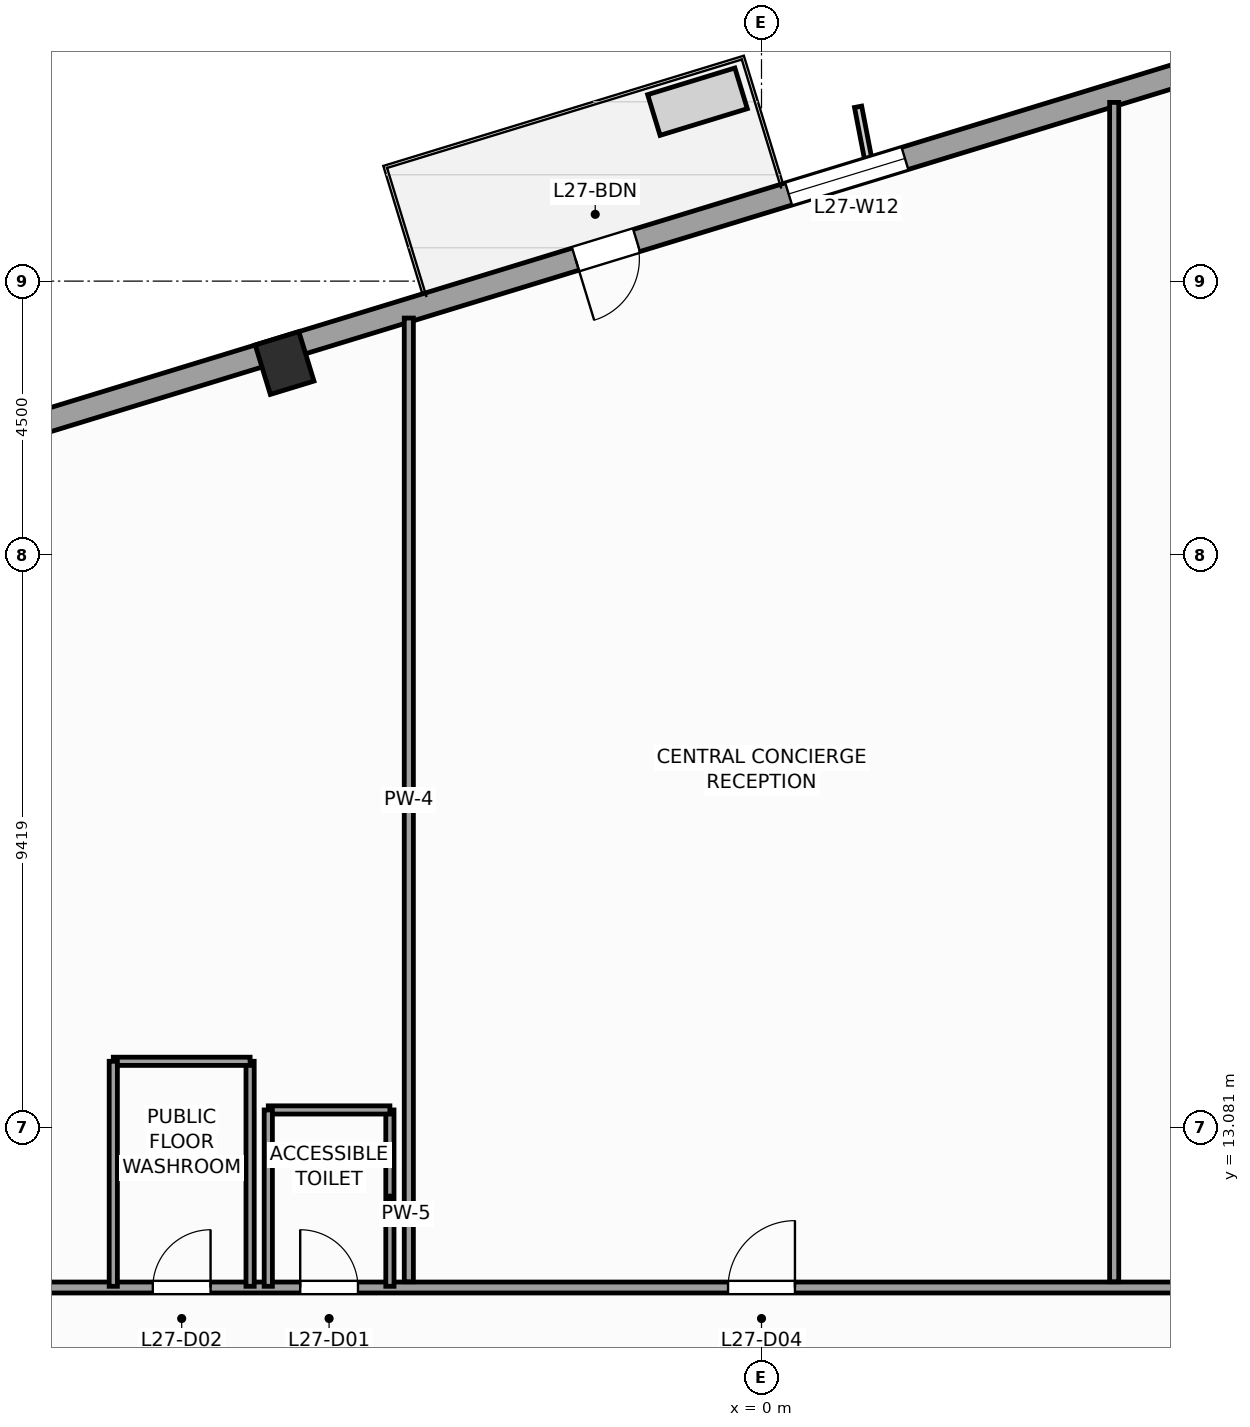
"""IFC4 building model, lengths in metres.
Left out: names, types, materials, properties, quantities, classifications, styles, units other than length and angle.
Written with IfcOpenShell. Run it as: python <this file> out.ifc"""

import sys

from ifc_helpers import new_model, si_unit, direction, frame, frame_2d, origin, origin_2d, place, context, subcontext, project, spatial, rectangle, extrude, source, transform, mapped, element, fill, save


model = new_model("IFC4")
c1 = context("Model", 3, precision=1e-05, world=origin(), true_north=direction((0.0, 1.0)))
c2 = subcontext(c1, "Body", "Model", "MODEL_VIEW")
j1 = project(units=[si_unit("LENGTHUNIT", "METRE"), si_unit("PLANEANGLEUNIT", "RADIAN")], contexts=[c1])
p1 = place(None, origin())
s1 = spatial("IfcSite", under=j1, at=p1, CompositionType="ELEMENT")
p2 = place(p1, origin())
s2 = spatial("IfcBuilding", under=s1, at=p2, CompositionType="ELEMENT")
p3 = place(p2, frame((0.0, 0.0, 115.2)))
s3 = spatial("IfcBuildingStorey", under=s2, at=p3, CompositionType="ELEMENT", Elevation=115.2)
m1 = source(origin(), c2, "Body", "SweptSolid", [
    extrude(rectangle(XDim=0.75, YDim=0.85, at=origin_2d()), origin(), (0.0, 0.0, 1.0), 4.0),
])
p4 = place(p3, frame((-7.843, 25.653, 0.0), z_axis=(0.0, 0.0, 1.0), x_axis=(0.956304755963, 0.292371704723, 0.0)))
e1 = element("IfcColumn", 1, at=p4, inside=s3, PredefinedType="COLUMN", context=c2, shape_type="MappedRepresentation", body=[
    mapped(m1, transform((0.0, 0.0, 0.0), scale=1.0)),
])
p5 = place(p3, frame((14.265, 32.658, 0.0), z_axis=(0.0, 0.0, 1.0), x_axis=(-0.956304320851, -0.292373127906, 0.0)))
e2 = element("IfcWall", 2, at=p5, inside=s3, PredefinedType="STANDARD", context=c2, shape_type="SweptSolid", body=[
    extrude(rectangle(XDim=46.38, YDim=0.38, at=frame_2d((23.19, 0.0))), origin(), (0.0, 0.0, 1.0), 3.14),
])
p6 = place(p5, frame((17.065, 0.0, 0.0)))
e3 = element("IfcOpeningElement", 3, at=p6, cuts=e2, PredefinedType="OPENING", context=c2, shape_type="SweptSolid", body=[
    extrude(rectangle(XDim=1.05, YDim=2.25, at=frame_2d((0.525, 1.125))), frame((0.0, 0.2, 0.0), z_axis=(0.0, -1.0, 0.0), x_axis=(1.0, 0.0, 0.0)), (0.0, 0.0, 1.0), 0.4),
])
p7 = place(p5, frame((4.865, 0.0, 0.51)))
e4 = element("IfcOpeningElement", 4, at=p7, cuts=e2, PredefinedType="OPENING", context=c2, shape_type="SweptSolid", body=[
    extrude(rectangle(XDim=1.4, YDim=2.4, at=frame_2d((0.7, 1.2))), frame((0.0, 0.2, 0.0), z_axis=(0.0, -1.0, 0.0), x_axis=(1.0, 0.0, 0.0)), (0.0, 0.0, 1.0), 0.4),
])
p8 = place(p5, frame((12.45, 0.0, 0.51)))
e5 = element("IfcOpeningElement", 5, at=p8, cuts=e2, PredefinedType="OPENING", context=c2, shape_type="SweptSolid", body=[
    extrude(rectangle(XDim=2.0, YDim=2.4, at=frame_2d((1.0, 1.2))), frame((0.0, 0.2, 0.0), z_axis=(0.0, -1.0, 0.0), x_axis=(1.0, 0.0, 0.0)), (0.0, 0.0, 1.0), 0.4),
])
p9 = place(p5, frame((30.538, 0.0, 0.51)))
e6 = element("IfcOpeningElement", 6, at=p9, cuts=e2, PredefinedType="OPENING", context=c2, shape_type="SweptSolid", body=[
    extrude(rectangle(XDim=2.0, YDim=2.4, at=frame_2d((1.0, 1.2))), frame((0.0, 0.2, 0.0), z_axis=(0.0, -1.0, 0.0), x_axis=(1.0, 0.0, 0.0)), (0.0, 0.0, 1.0), 0.4),
])
p10 = place(p5, frame((39.187, 0.0, 0.51)))
e7 = element("IfcOpeningElement", 7, at=p10, cuts=e2, PredefinedType="OPENING", context=c2, shape_type="SweptSolid", body=[
    extrude(rectangle(XDim=1.4, YDim=2.4, at=frame_2d((0.7, 1.2))), frame((0.0, 0.2, 0.0), z_axis=(0.0, -1.0, 0.0), x_axis=(1.0, 0.0, 0.0)), (0.0, 0.0, 1.0), 0.4),
])
p11 = place(p3, frame((-12.6, 10.45, 0.0), z_axis=(0.0, 0.0, 1.0), x_axis=(1.0, 0.0, 0.0)))
e8 = element("IfcWall", 8, at=p11, inside=s3, PredefinedType="PARTITIONING", context=c2, shape_type="SweptSolid", body=[
    extrude(rectangle(XDim=25.2, YDim=0.18, at=frame_2d((12.6, 0.0))), origin(), (0.0, 0.0, 1.0), 3.74),
])
p12 = place(p11, frame((5.014, 0.0, 0.0)))
e9 = element("IfcOpeningElement", 9, at=p12, cuts=e8, PredefinedType="OPENING", context=c2, shape_type="SweptSolid", body=[
    extrude(rectangle(XDim=0.95, YDim=2.1, at=frame_2d((0.475, 1.05))), frame((0.0, 0.1, 0.0), z_axis=(0.0, -1.0, 0.0), x_axis=(1.0, 0.0, 0.0)), (0.0, 0.0, 1.0), 0.2),
])
p13 = place(p11, frame((2.59, 0.0, 0.0)))
e10 = element("IfcOpeningElement", 10, at=p13, cuts=e8, PredefinedType="OPENING", context=c2, shape_type="SweptSolid", body=[
    extrude(rectangle(XDim=0.95, YDim=2.1, at=frame_2d((0.475, 1.05))), frame((0.0, 0.1, 0.0), z_axis=(0.0, -1.0, 0.0), x_axis=(1.0, 0.0, 0.0)), (0.0, 0.0, 1.0), 0.2),
])
p14 = place(p11, frame((12.05, 0.0, 0.0)))
e11 = element("IfcOpeningElement", 11, at=p14, cuts=e8, PredefinedType="OPENING", context=c2, shape_type="SweptSolid", body=[
    extrude(rectangle(XDim=1.1, YDim=2.2, at=frame_2d((0.55, 1.1))), frame((0.0, 0.1, 0.0), z_axis=(0.0, -1.0, 0.0), x_axis=(1.0, 0.0, 0.0)), (0.0, 0.0, 1.0), 0.2),
])
p15 = place(p3, frame((-5.8, 10.545, 0.0), z_axis=(0.0, 0.0, 1.0), x_axis=(0.0, 1.0, 0.0)))
e12 = element("IfcWall", 12, at=p15, inside=s3, PredefinedType="PARTITIONING", context=c2, shape_type="SweptSolid", body=[
    extrude(rectangle(XDim=15.848, YDim=0.15, at=frame_2d((7.924, 0.0))), origin(), (0.0, 0.0, 1.0), 3.74),
])
p16 = place(p3, frame((5.8, 10.545, 0.0), z_axis=(0.0, 0.0, 1.0), x_axis=(0.0, 1.0, 0.0)))
e13 = element("IfcWall", 13, at=p16, inside=s3, PredefinedType="PARTITIONING", context=c2, shape_type="SweptSolid", body=[
    extrude(rectangle(XDim=19.394, YDim=0.15, at=frame_2d((9.697, 0.0))), origin(), (0.0, 0.0, 1.0), 3.74),
])
p17 = place(p3, frame((-6.111, 10.47, 0.0), z_axis=(0.0, 0.0, 1.0), x_axis=(0.0, 1.0, 0.0)))
e14 = element("IfcWall", 14, at=p17, inside=s3, PredefinedType="PARTITIONING", context=c2, shape_type="SweptSolid", body=[
    extrude(rectangle(XDim=2.9, YDim=0.135, at=frame_2d((1.45, 0.0))), origin(), (0.0, 0.0, 1.0), 3.74),
])
p18 = place(p3, frame((-8.111, 13.37, 0.0), z_axis=(0.0, 0.0, 1.0), x_axis=(1.0, 0.0, 0.0)))
e15 = element("IfcWall", 15, at=p18, inside=s3, PredefinedType="PARTITIONING", context=c2, shape_type="SweptSolid", body=[
    extrude(rectangle(XDim=2.0, YDim=0.135, at=frame_2d((1.0, 0.0))), origin(), (0.0, 0.0, 1.0), 2.732),
])
p19 = place(p3, frame((-8.111, 10.47, 0.0), z_axis=(0.0, 0.0, 1.0), x_axis=(0.0, 1.0, 0.0)))
e16 = element("IfcWall", 16, at=p19, inside=s3, PredefinedType="PARTITIONING", context=c2, shape_type="SweptSolid", body=[
    extrude(rectangle(XDim=2.9, YDim=0.135, at=frame_2d((1.45, 0.0))), origin(), (0.0, 0.0, 1.0), 3.74),
])
p20 = place(p3, frame((-8.41, 10.47, 0.0), z_axis=(0.0, 0.0, 1.0), x_axis=(0.0, 1.0, 0.0)))
e17 = element("IfcWall", 17, at=p20, inside=s3, PredefinedType="PARTITIONING", context=c2, shape_type="SweptSolid", body=[
    extrude(rectangle(XDim=3.7, YDim=0.135, at=frame_2d((1.85, 0.0))), origin(), (0.0, 0.0, 1.0), 3.74),
])
p21 = place(p3, frame((-10.66, 14.17, 0.0), z_axis=(0.0, 0.0, 1.0), x_axis=(1.0, 0.0, 0.0)))
e18 = element("IfcWall", 18, at=p21, inside=s3, PredefinedType="PARTITIONING", context=c2, shape_type="SweptSolid", body=[
    extrude(rectangle(XDim=2.25, YDim=0.135, at=frame_2d((1.125, 0.0))), origin(), (0.0, 0.0, 1.0), 3.74),
])
p22 = place(p3, frame((-10.66, 10.47, 0.0), z_axis=(0.0, 0.0, 1.0), x_axis=(0.0, 1.0, 0.0)))
e19 = element("IfcWall", 19, at=p22, inside=s3, PredefinedType="PARTITIONING", context=c2, shape_type="SweptSolid", body=[
    extrude(rectangle(XDim=3.7, YDim=0.135, at=frame_2d((1.85, 0.0))), origin(), (0.0, 0.0, 1.0), 3.74),
])
m2 = source(origin(), c2, "Body", "SweptSolid", [
    extrude(rectangle(XDim=1.05, YDim=2.25, at=frame_2d((0.525, 1.125))), frame((0.0, 0.025, 0.0), z_axis=(0.0, -1.0, 0.0), x_axis=(1.0, 0.0, 0.0)), (0.0, 0.0, 1.0), 0.05),
])
p23 = place(p6, origin())
e20 = element("IfcDoor", 20, at=p23, inside=s3, OperationType="SINGLE_SWING_RIGHT", PredefinedType="DOOR", context=c2, shape_type="MappedRepresentation", body=[
    mapped(m2, transform((0.0, 0.0, 0.0), scale=1.0)),
])
fill(e3, e20)
m3 = source(origin(), c2, "Body", "SweptSolid", [
    extrude(rectangle(XDim=2.0, YDim=2.4, at=frame_2d((1.0, 1.2))), frame((0.0, 0.03, 0.0), z_axis=(0.0, -1.0, 0.0), x_axis=(1.0, 0.0, 0.0)), (0.0, 0.0, 1.0), 0.06),
])
p24 = place(p8, origin())
e21 = element("IfcWindow", 21, at=p24, inside=s3, PartitioningType="SINGLE_PANEL", PredefinedType="WINDOW", context=c2, shape_type="MappedRepresentation", body=[
    mapped(m3, transform((0.0, 0.0, 0.0), scale=1.0)),
])
fill(e5, e21)
m4 = source(origin(), c2, "Body", "SweptSolid", [
    extrude(rectangle(XDim=0.95, YDim=2.1, at=frame_2d((0.475, 1.05))), frame((0.0, 0.025, 0.0), z_axis=(0.0, -1.0, 0.0), x_axis=(1.0, 0.0, 0.0)), (0.0, 0.0, 1.0), 0.05),
])
p25 = place(p12, origin())
e22 = element("IfcDoor", 22, at=p25, inside=s3, OperationType="SINGLE_SWING_LEFT", PredefinedType="DOOR", context=c2, shape_type="MappedRepresentation", body=[
    mapped(m4, transform((0.0, 0.0, 0.0), scale=1.0)),
])
fill(e9, e22)
p26 = place(p13, origin())
e23 = element("IfcDoor", 23, at=p26, inside=s3, OperationType="SINGLE_SWING_RIGHT", PredefinedType="DOOR", context=c2, shape_type="MappedRepresentation", body=[
    mapped(m4, transform((0.0, 0.0, 0.0), scale=1.0)),
])
fill(e10, e23)
m5 = source(origin(), c2, "Body", "SweptSolid", [
    extrude(rectangle(XDim=1.1, YDim=2.2, at=frame_2d((0.55, 1.1))), frame((0.0, 0.025, 0.0), z_axis=(0.0, -1.0, 0.0), x_axis=(1.0, 0.0, 0.0)), (0.0, 0.0, 1.0), 0.05),
])
p27 = place(p14, origin())
e24 = element("IfcDoor", 24, at=p27, inside=s3, OperationType="SINGLE_SWING_RIGHT", PredefinedType="DOOR", context=c2, shape_type="MappedRepresentation", body=[
    mapped(m5, transform((0.0, 0.0, 0.0), scale=1.0)),
])
fill(e11, e24)
save(model, sys.argv[1])
